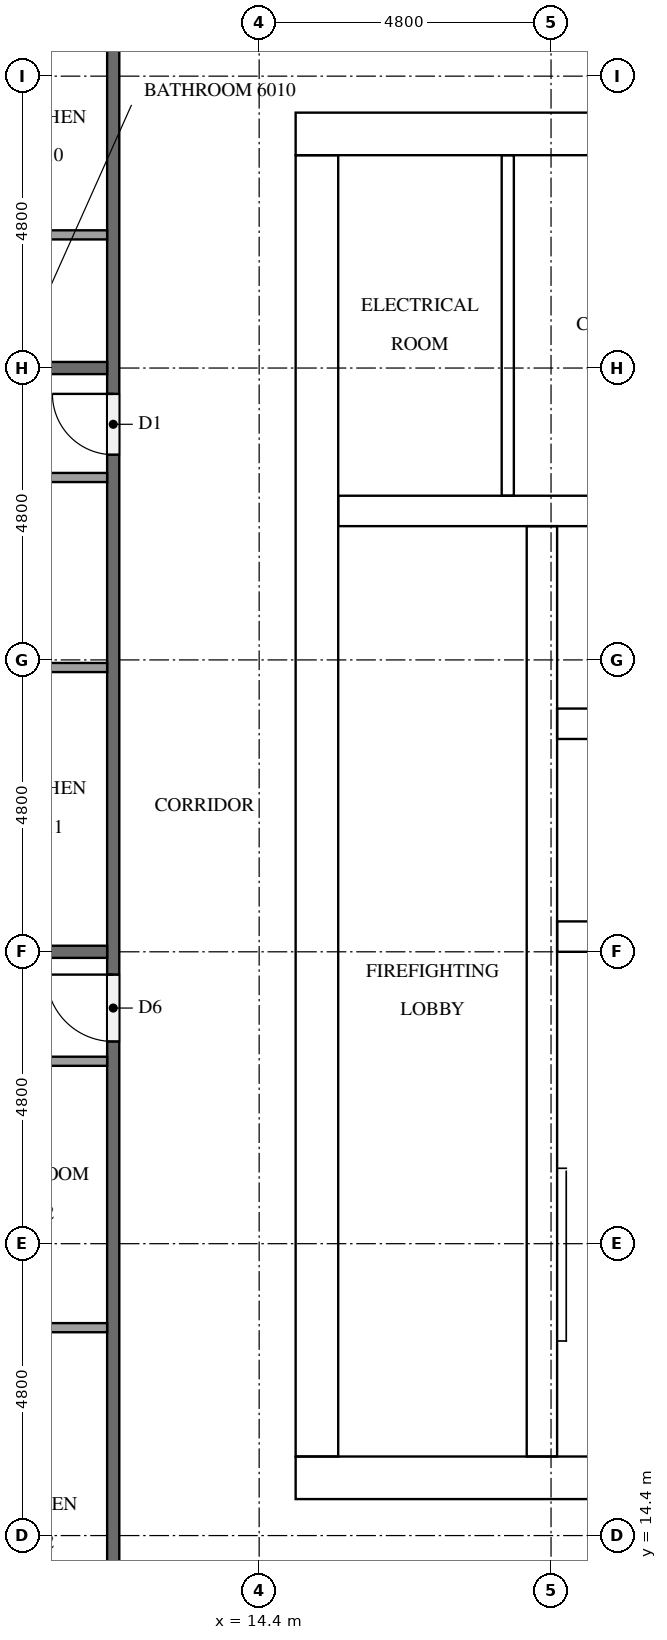
"""IFC4 building model, lengths in metres.
Left out: names, types, materials, properties, quantities, classifications, styles, units other than length and angle.
Written with IfcOpenShell. Run it as: python <this file> out.ifc"""

import sys

from ifc_helpers import new_model, si_unit, direction, frame, frame_2d, origin, place, context, subcontext, project, spatial, rectangle, extrude, element, fill, save


model = new_model("IFC4")
c1 = context("Model", 3, precision=1e-05, world=origin(), true_north=direction((0.0, 1.0)))
c2 = subcontext(c1, "Body", "Model", "MODEL_VIEW")
j1 = project(units=[si_unit("LENGTHUNIT", "METRE"), si_unit("PLANEANGLEUNIT", "RADIAN")], contexts=[c1])
p1 = place(None, origin())
s1 = spatial("IfcSite", under=j1, at=p1, CompositionType="ELEMENT")
p2 = place(p1, origin())
s2 = spatial("IfcBuilding", under=s1, at=p2, CompositionType="ELEMENT")
p3 = place(p2, frame((0.0, 0.0, 229.8)))
s3 = spatial("IfcBuildingStorey", under=s2, at=p3, CompositionType="ELEMENT", Elevation=229.8)
p4 = place(p3, frame((15.0, 15.35, 0.0), z_axis=(0.0, 0.0, 1.0), x_axis=(1.0, 0.0, 0.0)))
e1 = element("IfcWall", 1, at=p4, inside=s3, PredefinedType="SHEAR", context=c2, shape_type="SweptSolid", body=[
    extrude(rectangle(XDim=32.4, YDim=0.7, at=frame_2d((16.2, 0.0))), origin(), (0.0, 0.0, 1.0), 3.1),
])
p5 = place(p4, frame((15.3, 0.0, 0.0)))
e2 = element("IfcOpeningElement", 2, at=p5, cuts=e1, PredefinedType="OPENING", context=c2, shape_type="SweptSolid", body=[
    extrude(rectangle(XDim=1.8, YDim=2.1, at=frame_2d((0.9, 1.05))), frame((0.0, 0.36, 0.0), z_axis=(0.0, -1.0, 0.0), x_axis=(1.0, 0.0, 0.0)), (0.0, 0.0, 1.0), 0.72),
])
p6 = place(p3, frame((15.0, 37.45, 0.0), z_axis=(0.0, 0.0, 1.0), x_axis=(1.0, 0.0, 0.0)))
e3 = element("IfcWall", 3, at=p6, inside=s3, PredefinedType="SHEAR", context=c2, shape_type="SweptSolid", body=[
    extrude(rectangle(XDim=32.4, YDim=0.7, at=frame_2d((16.2, 0.0))), origin(), (0.0, 0.0, 1.0), 3.1),
])
p7 = place(p6, frame((15.3, 0.0, 0.0)))
e4 = element("IfcOpeningElement", 4, at=p7, cuts=e3, PredefinedType="OPENING", context=c2, shape_type="SweptSolid", body=[
    extrude(rectangle(XDim=1.8, YDim=2.1, at=frame_2d((0.9, 1.05))), frame((0.0, 0.36, 0.0), z_axis=(0.0, -1.0, 0.0), x_axis=(1.0, 0.0, 0.0)), (0.0, 0.0, 1.0), 0.72),
])
p8 = place(p6, frame((1.544, 0.0, 0.0)))
e5 = element("IfcOpeningElement", 5, at=p8, cuts=e3, PredefinedType="OPENING", context=c2, shape_type="SweptSolid", body=[
    extrude(rectangle(XDim=1.0, YDim=2.1, at=frame_2d((0.5, 1.05))), frame((0.0, 0.36, 0.0), z_axis=(0.0, -1.0, 0.0), x_axis=(1.0, 0.0, 0.0)), (0.0, 0.0, 1.0), 0.72),
])
p9 = place(p6, frame((5.219, 0.0, 0.0)))
e6 = element("IfcOpeningElement", 6, at=p9, cuts=e3, PredefinedType="OPENING", context=c2, shape_type="SweptSolid", body=[
    extrude(rectangle(XDim=1.0, YDim=2.1, at=frame_2d((0.5, 1.05))), frame((0.0, 0.36, 0.0), z_axis=(0.0, -1.0, 0.0), x_axis=(1.0, 0.0, 0.0)), (0.0, 0.0, 1.0), 0.72),
])
p10 = place(p3, frame((15.35, 15.7, 0.0), z_axis=(0.0, 0.0, 1.0), x_axis=(0.0, 1.0, 0.0)))
e7 = element("IfcWall", 7, at=p10, inside=s3, PredefinedType="SHEAR", context=c2, shape_type="SweptSolid", body=[
    extrude(rectangle(XDim=21.4, YDim=0.7, at=frame_2d((10.7, 0.0))), origin(), (0.0, 0.0, 1.0), 3.1),
])
p11 = place(p10, frame((5.06, 0.0, 0.0)))
e8 = element("IfcOpeningElement", 8, at=p11, cuts=e7, PredefinedType="OPENING", context=c2, shape_type="SweptSolid", body=[
    extrude(rectangle(XDim=1.2, YDim=2.1, at=frame_2d((0.6, 1.05))), frame((0.0, 0.36, 0.0), z_axis=(0.0, -1.0, 0.0), x_axis=(1.0, 0.0, 0.0)), (0.0, 0.0, 1.0), 0.72),
])
p12 = place(p3, frame((19.05, 15.7, 0.0), z_axis=(0.0, 0.0, 1.0), x_axis=(0.0, 1.0, 0.0)))
e9 = element("IfcWall", 9, at=p12, inside=s3, PredefinedType="SHEAR", context=c2, shape_type="SweptSolid", body=[
    extrude(rectangle(XDim=15.3, YDim=0.5, at=frame_2d((7.65, 0.0))), origin(), (0.0, 0.0, 1.0), 3.1),
])
p13 = place(p12, frame((9.75, 0.0, 0.0)))
e10 = element("IfcOpeningElement", 10, at=p13, cuts=e9, PredefinedType="OPENING", context=c2, shape_type="SweptSolid", body=[
    extrude(rectangle(XDim=1.1, YDim=2.1, at=frame_2d((0.55, 1.05))), frame((0.0, 0.26, 0.0), z_axis=(0.0, -1.0, 0.0), x_axis=(1.0, 0.0, 0.0)), (0.0, 0.0, 1.0), 0.52),
])
p14 = place(p12, frame((13.25, 0.0, 0.0)))
e11 = element("IfcOpeningElement", 11, at=p14, cuts=e9, PredefinedType="OPENING", context=c2, shape_type="SweptSolid", body=[
    extrude(rectangle(XDim=1.1, YDim=2.1, at=frame_2d((0.55, 1.05))), frame((0.0, 0.26, 0.0), z_axis=(0.0, -1.0, 0.0), x_axis=(1.0, 0.0, 0.0)), (0.0, 0.0, 1.0), 0.52),
])
p15 = place(p12, frame((0.5, 0.0, 0.0)))
e12 = element("IfcOpeningElement", 12, at=p15, cuts=e9, PredefinedType="OPENING", context=c2, shape_type="SweptSolid", body=[
    extrude(rectangle(XDim=1.2, YDim=2.1, at=frame_2d((0.6, 1.05))), frame((0.0, 0.26, 0.0), z_axis=(0.0, -1.0, 0.0), x_axis=(1.0, 0.0, 0.0)), (0.0, 0.0, 1.0), 0.52),
])
for number, where, z_axis, x_axis in (
    (13, (19.3, 24.25, 0.0), (0.0, 0.0, 1.0), (1.0, 0.0, 0.0)),
    (14, (19.3, 27.75, 0.0), (0.0, 0.0, 1.0), (1.0, 0.0, 0.0)),
):
    element("IfcWall", number, at=place(p3, frame(where, z_axis=z_axis, x_axis=x_axis)), inside=s3, PredefinedType="SHEAR", context=c2, shape_type="SweptSolid", body=[
        extrude(rectangle(XDim=3.55, YDim=0.5, at=frame_2d((1.775, 0.0))), origin(), (0.0, 0.0, 1.0), 3.1),
    ])
p16 = place(p3, frame((15.7, 31.25, 0.0), z_axis=(0.0, 0.0, 1.0), x_axis=(1.0, 0.0, 0.0)))
e15 = element("IfcWall", 15, at=p16, inside=s3, PredefinedType="SHEAR", context=c2, shape_type="SweptSolid", body=[
    extrude(rectangle(XDim=7.15, YDim=0.5, at=frame_2d((3.575, 0.0))), origin(), (0.0, 0.0, 1.0), 3.1),
])
p17 = place(p3, frame((18.489, 31.5, 0.0), z_axis=(0.0, 0.0, 1.0), x_axis=(0.0, 1.0, 0.0)))
e16 = element("IfcWall", 16, at=p17, inside=s3, PredefinedType="PARTITIONING", context=c2, shape_type="SweptSolid", body=[
    extrude(rectangle(XDim=5.6, YDim=0.2, at=frame_2d((2.8, 0.0))), origin(), (0.0, 0.0, 1.0), 3.1),
])
p18 = place(p3, frame((12.0, 12.1, 0.0), z_axis=(0.0, 0.0, 1.0), x_axis=(0.0, 1.0, 0.0)))
e17 = element("IfcWall", 17, at=p18, inside=s3, PredefinedType="PARTITIONING", context=c2, shape_type="SweptSolid", body=[
    extrude(rectangle(XDim=28.6, YDim=0.2, at=frame_2d((14.3, 0.0))), origin(), (0.0, 0.0, 1.0), 3.1),
])
p19 = place(p18, frame((27.275, 0.0, 0.0)))
e18 = element("IfcOpeningElement", 18, at=p19, cuts=e17, PredefinedType="OPENING", context=c2, shape_type="SweptSolid", body=[
    extrude(rectangle(XDim=1.0, YDim=2.1, at=frame_2d((0.5, 1.05))), frame((0.0, 0.11, 0.0), z_axis=(0.0, -1.0, 0.0), x_axis=(1.0, 0.0, 0.0)), (0.0, 0.0, 1.0), 0.22),
])
p20 = place(p18, frame((20.075, 0.0, 0.0)))
e19 = element("IfcOpeningElement", 19, at=p20, cuts=e17, PredefinedType="OPENING", context=c2, shape_type="SweptSolid", body=[
    extrude(rectangle(XDim=1.0, YDim=2.1, at=frame_2d((0.5, 1.05))), frame((0.0, 0.11, 0.0), z_axis=(0.0, -1.0, 0.0), x_axis=(1.0, 0.0, 0.0)), (0.0, 0.0, 1.0), 0.22),
])
p21 = place(p18, frame((10.425, 0.0, 0.0)))
e20 = element("IfcOpeningElement", 20, at=p21, cuts=e17, PredefinedType="OPENING", context=c2, shape_type="SweptSolid", body=[
    extrude(rectangle(XDim=1.1, YDim=2.1, at=frame_2d((0.55, 1.05))), frame((0.0, 0.11, 0.0), z_axis=(0.0, -1.0, 0.0), x_axis=(1.0, 0.0, 0.0)), (0.0, 0.0, 1.0), 0.22),
])
for number, where, z_axis, x_axis in (
    (21, (4.9, 33.6, 0.0), (0.0, 0.0, 1.0), (1.0, 0.0, 0.0)),
    (22, (4.9, 24.0, 0.0), (0.0, 0.0, 1.0), (1.0, 0.0, 0.0)),
):
    element("IfcWall", number, at=place(p3, frame(where, z_axis=z_axis, x_axis=x_axis)), inside=s3, PredefinedType="PARTITIONING", context=c2, shape_type="SweptSolid", body=[
        extrude(rectangle(XDim=7.0, YDim=0.2, at=frame_2d((3.5, 0.0))), origin(), (0.0, 0.0, 1.0), 3.1),
    ])
for number, where, z_axis, x_axis in (
    (23, (11.9, 35.79, 0.0), (0.0, 0.0, 1.0), (-1.0, 0.0, 0.0)),
    (24, (11.9, 28.675, 0.0), (0.0, 0.0, 1.0), (-1.0, 0.0, 0.0)),
):
    element("IfcWall", number, at=place(p3, frame(where, z_axis=z_axis, x_axis=x_axis)), inside=s3, PredefinedType="PARTITIONING", context=c2, shape_type="SweptSolid", body=[
        extrude(rectangle(XDim=2.075, YDim=0.15, at=frame_2d((1.038, 0.0))), origin(), (0.0, 0.0, 1.0), 3.1),
    ])
p22 = place(p3, frame((11.9, 31.8, 0.0), z_axis=(0.0, 0.0, 1.0), x_axis=(-1.0, 0.0, 0.0)))
e25 = element("IfcWall", 25, at=p22, inside=s3, PredefinedType="PARTITIONING", context=c2, shape_type="SweptSolid", body=[
    extrude(rectangle(XDim=2.225, YDim=0.15, at=frame_2d((1.112, 0.0))), origin(), (0.0, 0.0, 1.0), 3.1),
])
p23 = place(p3, frame((11.9, 17.819, 0.0), z_axis=(0.0, 0.0, 1.0), x_axis=(-1.0, 0.0, 0.0)))
e26 = element("IfcWall", 26, at=p23, inside=s3, PredefinedType="PARTITIONING", context=c2, shape_type="SweptSolid", body=[
    extrude(rectangle(XDim=2.375, YDim=0.15, at=frame_2d((1.188, 0.0))), origin(), (0.0, 0.0, 1.0), 3.1),
])
p24 = place(p3, frame((11.9, 22.2, 0.0), z_axis=(0.0, 0.0, 1.0), x_axis=(-1.0, 0.0, 0.0)))
e27 = element("IfcWall", 27, at=p24, inside=s3, PredefinedType="PARTITIONING", context=c2, shape_type="SweptSolid", body=[
    extrude(rectangle(XDim=2.525, YDim=0.15, at=frame_2d((1.262, 0.0))), origin(), (0.0, 0.0, 1.0), 3.1),
])
p25 = place(p13, origin())
e28 = element("IfcDoor", 28, at=p25, inside=s3, OperationType="DOUBLE_DOOR_SLIDING", PredefinedType="DOOR", context=c2, shape_type="SweptSolid", body=[
    extrude(rectangle(XDim=1.1, YDim=2.1, at=frame_2d((0.55, 1.05))), frame((0.0, 0.025, 0.0), z_axis=(0.0, -1.0, 0.0), x_axis=(1.0, 0.0, 0.0)), (0.0, 0.0, 1.0), 0.05),
])
fill(e10, e28)
p26 = place(p14, origin())
e29 = element("IfcDoor", 29, at=p26, inside=s3, OperationType="DOUBLE_DOOR_SLIDING", PredefinedType="DOOR", context=c2, shape_type="SweptSolid", body=[
    extrude(rectangle(XDim=1.1, YDim=2.1, at=frame_2d((0.55, 1.05))), frame((0.0, 0.025, 0.0), z_axis=(0.0, -1.0, 0.0), x_axis=(1.0, 0.0, 0.0)), (0.0, 0.0, 1.0), 0.05),
])
fill(e11, e29)
p27 = place(p15, frame((1.2, 0.0, 0.0), z_axis=(0.0, 0.0, 1.0), x_axis=(-1.0, 0.0, 0.0)))
e30 = element("IfcDoor", 30, at=p27, inside=s3, OperationType="SINGLE_SWING_RIGHT", PredefinedType="DOOR", context=c2, shape_type="SweptSolid", body=[
    extrude(rectangle(XDim=1.2, YDim=2.1, at=frame_2d((0.6, 1.05))), frame((0.0, 0.025, 0.0), z_axis=(0.0, -1.0, 0.0), x_axis=(1.0, 0.0, 0.0)), (0.0, 0.0, 1.0), 0.05),
])
fill(e12, e30)
p28 = place(p11, frame((1.2, 0.0, 0.0), z_axis=(0.0, 0.0, 1.0), x_axis=(-1.0, 0.0, 0.0)))
e31 = element("IfcDoor", 31, at=p28, inside=s3, OperationType="SINGLE_SWING_LEFT", PredefinedType="DOOR", context=c2, shape_type="SweptSolid", body=[
    extrude(rectangle(XDim=1.2, YDim=2.1, at=frame_2d((0.6, 1.05))), frame((0.0, 0.025, 0.0), z_axis=(0.0, -1.0, 0.0), x_axis=(1.0, 0.0, 0.0)), (0.0, 0.0, 1.0), 0.05),
])
fill(e8, e31)
p29 = place(p8, origin())
e32 = element("IfcDoor", 32, at=p29, inside=s3, OperationType="SINGLE_SWING_LEFT", PredefinedType="DOOR", context=c2, shape_type="SweptSolid", body=[
    extrude(rectangle(XDim=1.0, YDim=2.1, at=frame_2d((0.5, 1.05))), frame((0.0, 0.025, 0.0), z_axis=(0.0, -1.0, 0.0), x_axis=(1.0, 0.0, 0.0)), (0.0, 0.0, 1.0), 0.05),
])
fill(e5, e32)
p30 = place(p20, origin())
e33 = element("IfcDoor", 33, at=p30, inside=s3, OperationType="SINGLE_SWING_RIGHT", PredefinedType="DOOR", context=c2, shape_type="SweptSolid", body=[
    extrude(rectangle(XDim=1.0, YDim=2.1, at=frame_2d((0.5, 1.05))), frame((0.0, 0.025, 0.0), z_axis=(0.0, -1.0, 0.0), x_axis=(1.0, 0.0, 0.0)), (0.0, 0.0, 1.0), 0.05),
])
fill(e19, e33)
p31 = place(p21, origin())
e34 = element("IfcDoor", 34, at=p31, inside=s3, OperationType="SINGLE_SWING_RIGHT", PredefinedType="DOOR", context=c2, shape_type="SweptSolid", body=[
    extrude(rectangle(XDim=1.1, YDim=2.1, at=frame_2d((0.55, 1.05))), frame((0.0, 0.025, 0.0), z_axis=(0.0, -1.0, 0.0), x_axis=(1.0, 0.0, 0.0)), (0.0, 0.0, 1.0), 0.05),
])
fill(e20, e34)
save(model, sys.argv[1])
